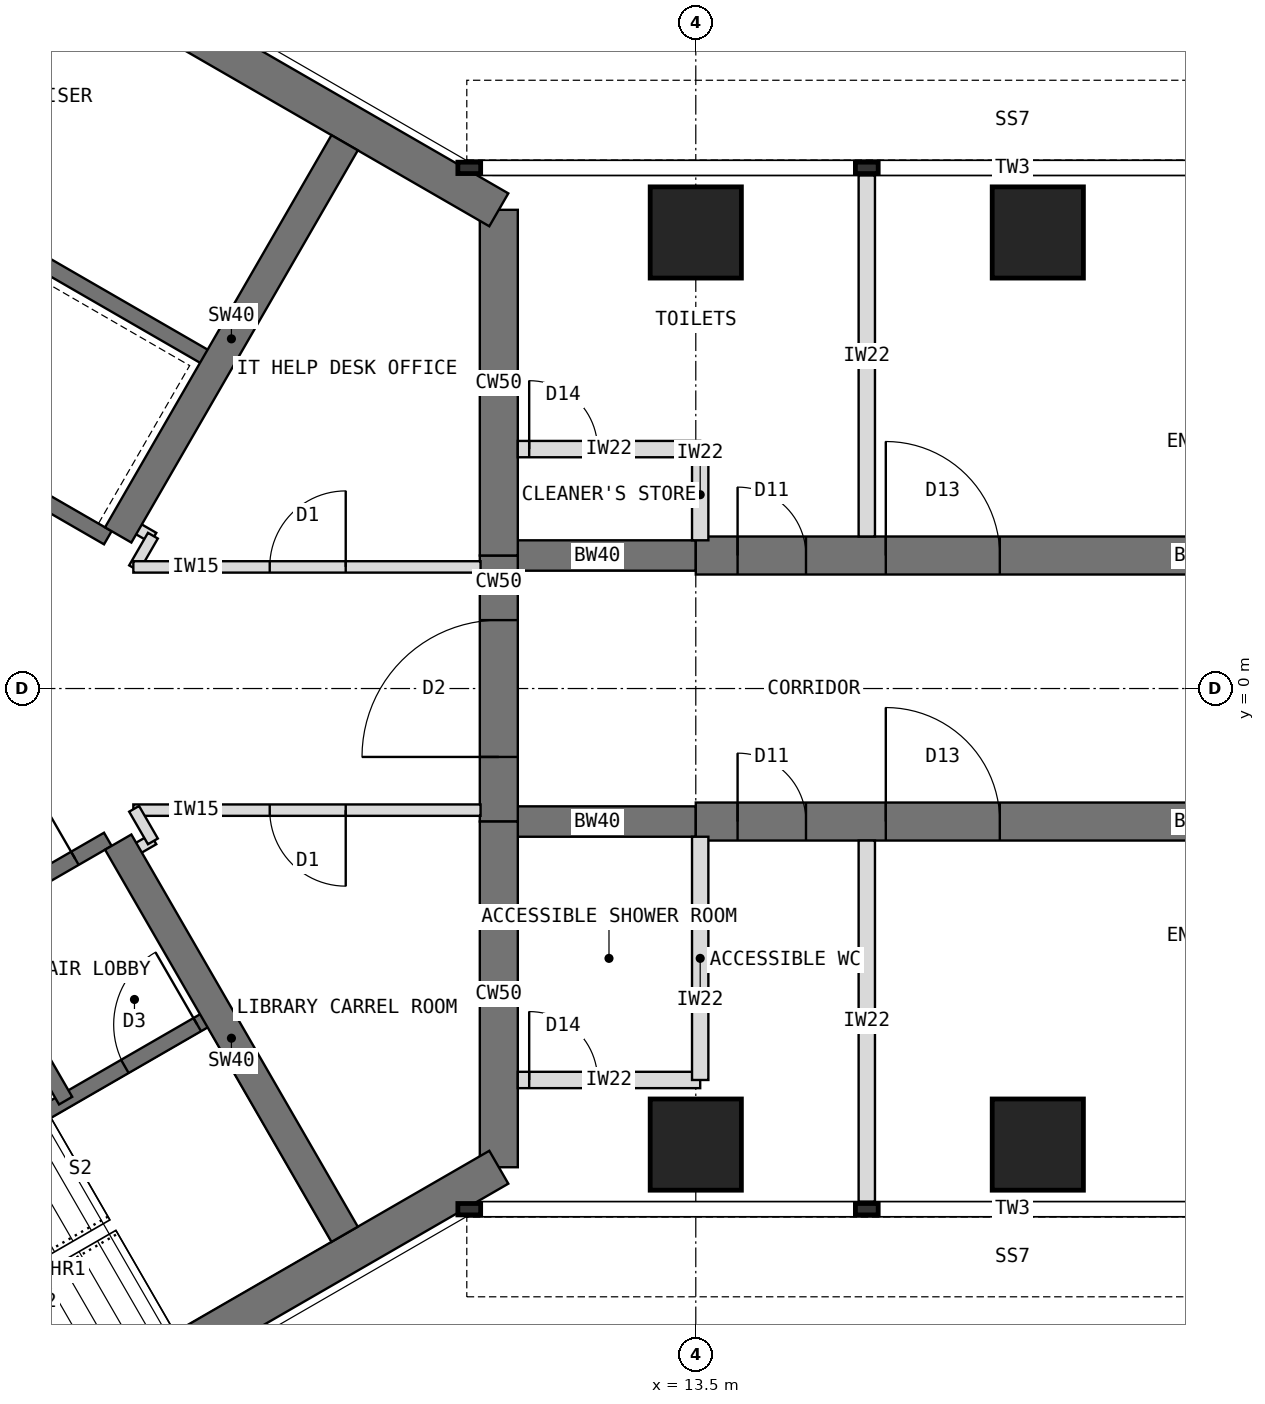
"""IFC4 building model, lengths in metres.
Left out: names, types, materials, properties, quantities, classifications, styles, units other than length and angle.
Written with IfcOpenShell. Run it as: python <this file> out.ifc"""

import sys

from ifc_helpers import new_model, si_unit, direction, frame, frame_2d, origin, origin_2d, place, context, subcontext, project, spatial, rectangle, extrude, element, fill, save


model = new_model("IFC4")
c1 = context("Model", 3, precision=1e-05, world=origin(), true_north=direction((0.0, 1.0)))
c2 = subcontext(c1, "Body", "Model", "MODEL_VIEW")
j1 = project(units=[si_unit("LENGTHUNIT", "METRE"), si_unit("PLANEANGLEUNIT", "RADIAN")], contexts=[c1])
p1 = place(None, origin())
s1 = spatial("IfcSite", under=j1, at=p1, CompositionType="ELEMENT")
p2 = place(p1, origin())
s2 = spatial("IfcBuilding", under=s1, at=p2, CompositionType="ELEMENT")
p3 = place(p2, frame((0.0, 0.0, 174.5)))
s3 = spatial("IfcBuildingStorey", under=s2, at=p3, CompositionType="ELEMENT", Elevation=174.5)
p4 = place(p3, frame((10.908, -6.298, 0.0), z_axis=(0.0, 0.0, 1.0), x_axis=(0.0, 1.0, 0.0)))
e1 = element("IfcWall", 1, at=p4, inside=s3, PredefinedType="SHEAR", context=c2, shape_type="SweptSolid", body=[
    extrude(rectangle(XDim=4.548, YDim=0.5, at=frame_2d((2.274, 0.0))), origin(), (0.0, 0.0, 1.0), 4.0),
])
p5 = place(p3, frame((10.908, -1.75, 0.0), z_axis=(0.0, 0.0, 1.0), x_axis=(0.0, 1.0, 0.0)))
e2 = element("IfcWall", 2, at=p5, inside=s3, PredefinedType="SHEAR", context=c2, shape_type="SweptSolid", body=[
    extrude(rectangle(XDim=3.5, YDim=0.5, at=frame_2d((1.75, 0.0))), origin(), (0.0, 0.0, 1.0), 4.0),
])
p6 = place(p5, frame((0.85, 0.0, 0.0)))
e3 = element("IfcOpeningElement", 3, at=p6, cuts=e2, PredefinedType="OPENING", context=c2, shape_type="SweptSolid", body=[
    extrude(rectangle(XDim=1.8, YDim=2.1, at=frame_2d((0.9, 1.05))), frame((0.0, 0.26, 0.0), z_axis=(0.0, -1.0, 0.0), x_axis=(1.0, 0.0, 0.0)), (0.0, 0.0, 1.0), 0.52),
])
p7 = place(p3, frame((10.908, 1.75, 0.0), z_axis=(0.0, 0.0, 1.0), x_axis=(0.0, 1.0, 0.0)))
e4 = element("IfcWall", 4, at=p7, inside=s3, PredefinedType="SHEAR", context=c2, shape_type="SweptSolid", body=[
    extrude(rectangle(XDim=4.548, YDim=0.5, at=frame_2d((2.274, 0.0))), origin(), (0.0, 0.0, 1.0), 4.0),
])
for number, where, z_axis, x_axis in (
    (5, (10.908, 6.298, 0.0), (0.0, 0.0, 1.0), (-0.866, 0.5, 0.0)),
    (6, (0.0, -12.596, 0.0), (0.0, 0.0, 1.0), (0.866, 0.5, 0.0)),
):
    element("IfcWall", number, at=place(p3, frame(where, z_axis=z_axis, x_axis=x_axis)), inside=s3, PredefinedType="SHEAR", context=c2, shape_type="SweptSolid", body=[
        extrude(rectangle(XDim=12.596, YDim=0.5, at=frame_2d((6.298, 0.0))), origin(), (0.0, 0.0, 1.0), 4.0),
    ])
p8 = place(p3, frame((10.908, 1.75, 0.0), z_axis=(0.0, 0.0, 1.0), x_axis=(1.0, 0.0, 0.0)))
e7 = element("IfcWall", 7, at=p8, inside=s3, PredefinedType="SHEAR", context=c2, shape_type="SweptSolid", body=[
    extrude(rectangle(XDim=2.592, YDim=0.4, at=frame_2d((1.296, 0.0))), origin(), (0.0, 0.0, 1.0), 4.0),
])
p9 = place(p3, frame((13.5, 1.75, 0.0), z_axis=(0.0, 0.0, 1.0), x_axis=(1.0, 0.0, 0.0)))
e8 = element("IfcWall", 8, at=p9, inside=s3, PredefinedType="SHEAR", context=c2, shape_type="SweptSolid", body=[
    extrude(rectangle(XDim=13.2, YDim=0.5, at=frame_2d((6.6, 0.0))), origin(), (0.0, 0.0, 1.0), 4.0),
])
p10 = place(p9, frame((0.55, 0.0, 0.0)))
e9 = element("IfcOpeningElement", 9, at=p10, cuts=e8, PredefinedType="OPENING", context=c2, shape_type="SweptSolid", body=[
    extrude(rectangle(XDim=0.9, YDim=2.1, at=frame_2d((0.45, 1.05))), frame((0.0, 0.26, 0.0), z_axis=(0.0, -1.0, 0.0), x_axis=(1.0, 0.0, 0.0)), (0.0, 0.0, 1.0), 0.52),
])
p11 = place(p9, frame((2.5, 0.0, 0.0)))
e10 = element("IfcOpeningElement", 10, at=p11, cuts=e8, PredefinedType="OPENING", context=c2, shape_type="SweptSolid", body=[
    extrude(rectangle(XDim=1.5, YDim=2.1, at=frame_2d((0.75, 1.05))), frame((0.0, 0.26, 0.0), z_axis=(0.0, -1.0, 0.0), x_axis=(1.0, 0.0, 0.0)), (0.0, 0.0, 1.0), 0.52),
])
p12 = place(p3, frame((10.908, -1.75, 0.0), z_axis=(0.0, 0.0, 1.0), x_axis=(1.0, 0.0, 0.0)))
e11 = element("IfcWall", 11, at=p12, inside=s3, PredefinedType="SHEAR", context=c2, shape_type="SweptSolid", body=[
    extrude(rectangle(XDim=2.592, YDim=0.4, at=frame_2d((1.296, 0.0))), origin(), (0.0, 0.0, 1.0), 4.0),
])
p13 = place(p3, frame((13.5, -1.75, 0.0), z_axis=(0.0, 0.0, 1.0), x_axis=(1.0, 0.0, 0.0)))
e12 = element("IfcWall", 12, at=p13, inside=s3, PredefinedType="SHEAR", context=c2, shape_type="SweptSolid", body=[
    extrude(rectangle(XDim=13.2, YDim=0.5, at=frame_2d((6.6, 0.0))), origin(), (0.0, 0.0, 1.0), 4.0),
])
p14 = place(p13, frame((0.55, 0.0, 0.0)))
e13 = element("IfcOpeningElement", 13, at=p14, cuts=e12, PredefinedType="OPENING", context=c2, shape_type="SweptSolid", body=[
    extrude(rectangle(XDim=0.9, YDim=2.1, at=frame_2d((0.45, 1.05))), frame((0.0, 0.26, 0.0), z_axis=(0.0, -1.0, 0.0), x_axis=(1.0, 0.0, 0.0)), (0.0, 0.0, 1.0), 0.52),
])
p15 = place(p13, frame((2.5, 0.0, 0.0)))
e14 = element("IfcOpeningElement", 14, at=p15, cuts=e12, PredefinedType="OPENING", context=c2, shape_type="SweptSolid", body=[
    extrude(rectangle(XDim=1.5, YDim=2.1, at=frame_2d((0.75, 1.05))), frame((0.0, 0.26, 0.0), z_axis=(0.0, -1.0, 0.0), x_axis=(1.0, 0.0, 0.0)), (0.0, 0.0, 1.0), 0.52),
])
for number, where, z_axis, x_axis in (
    (15, (13.5, 6.0, 0.0), (0.0, 0.0, 1.0), (1.0, 0.0, 0.0)),
    (16, (13.5, -6.0, 0.0), (0.0, 0.0, 1.0), (1.0, 0.0, 0.0)),
    (17, (18.0, 6.0, 0.0), (0.0, 0.0, 1.0), (1.0, 0.0, 0.0)),
    (18, (18.0, -6.0, 0.0), (0.0, 0.0, 1.0), (1.0, 0.0, 0.0)),
):
    element("IfcColumn", number, at=place(p3, frame(where, z_axis=z_axis, x_axis=x_axis)), inside=s3, PredefinedType="COLUMN", context=c2, shape_type="SweptSolid", body=[
        extrude(rectangle(XDim=1.2, YDim=1.2, at=origin_2d()), origin(), (0.0, 0.0, 1.0), 4.0),
    ])
p16 = place(p3, frame((5.764, 1.984, 0.0), z_axis=(0.0, 0.0, 1.0), x_axis=(-0.866026010844, 0.49999894854, 0.0)))
e19 = element("IfcWall", 19, at=p16, inside=s3, PredefinedType="SHEAR", context=c2, shape_type="SweptSolid", body=[
    extrude(rectangle(XDim=8.0, YDim=0.2, at=frame_2d((4.0, 0.0))), origin(), (0.0, 0.0, 1.0), 4.0),
])
p17 = place(p16, frame((6.3, 0.0, 0.0)))
e20 = element("IfcOpeningElement", 20, at=p17, cuts=e19, PredefinedType="OPENING", context=c2, shape_type="SweptSolid", body=[
    extrude(rectangle(XDim=1.2, YDim=2.1, at=frame_2d((0.6, 1.05))), frame((0.0, 0.11, 0.0), z_axis=(0.0, -1.0, 0.0), x_axis=(1.0, 0.0, 0.0)), (0.0, 0.0, 1.0), 0.22),
])
p18 = place(p3, frame((7.114, 4.322, 0.0), z_axis=(0.0, 0.0, 1.0), x_axis=(-0.866026010844, 0.49999894854, 0.0)))
e21 = element("IfcWall", 21, at=p18, inside=s3, PredefinedType="SHEAR", context=c2, shape_type="SweptSolid", body=[
    extrude(rectangle(XDim=8.0, YDim=0.2, at=frame_2d((4.0, 0.0))), origin(), (0.0, 0.0, 1.0), 4.0),
])
p19 = place(p18, frame((6.8, 0.0, 0.0)))
e22 = element("IfcOpeningElement", 22, at=p19, cuts=e21, PredefinedType="OPENING", context=c2, shape_type="SweptSolid", body=[
    extrude(rectangle(XDim=0.9, YDim=2.1, at=frame_2d((0.45, 1.05))), frame((0.0, 0.11, 0.0), z_axis=(0.0, -1.0, 0.0), x_axis=(1.0, 0.0, 0.0)), (0.0, 0.0, 1.0), 0.22),
])
p20 = place(p3, frame((5.901, 2.02, 0.0), z_axis=(0.0, 0.0, 1.0), x_axis=(0.500003832394, 0.86602319114, 0.0)))
e23 = element("IfcWall", 23, at=p20, inside=s3, PredefinedType="SHEAR", context=c2, shape_type="SweptSolid", body=[
    extrude(rectangle(XDim=5.958, YDim=0.4, at=frame_2d((2.979, 0.0))), origin(), (0.0, 0.0, 1.0), 4.0),
])
p21 = place(p3, frame((-1.164, -5.984, 0.0), z_axis=(0.0, 0.0, 1.0), x_axis=(0.866026010844, 0.49999894854, 0.0)))
e24 = element("IfcWall", 24, at=p21, inside=s3, PredefinedType="SHEAR", context=c2, shape_type="SweptSolid", body=[
    extrude(rectangle(XDim=8.0, YDim=0.2, at=frame_2d((4.0, 0.0))), origin(), (0.0, 0.0, 1.0), 4.0),
])
p22 = place(p21, frame((6.3, 0.0, 0.0)))
e25 = element("IfcOpeningElement", 25, at=p22, cuts=e24, PredefinedType="OPENING", context=c2, shape_type="SweptSolid", body=[
    extrude(rectangle(XDim=1.2, YDim=2.1, at=frame_2d((0.6, 1.05))), frame((0.0, 0.11, 0.0), z_axis=(0.0, -1.0, 0.0), x_axis=(1.0, 0.0, 0.0)), (0.0, 0.0, 1.0), 0.22),
])
p23 = place(p21, frame((0.9, 0.0, 0.0)))
e26 = element("IfcOpeningElement", 26, at=p23, cuts=e24, PredefinedType="OPENING", context=c2, shape_type="SweptSolid", body=[
    extrude(rectangle(XDim=1.1, YDim=2.2, at=frame_2d((0.55, 1.1))), frame((0.0, 0.11, 0.0), z_axis=(0.0, -1.0, 0.0), x_axis=(1.0, 0.0, 0.0)), (0.0, 0.0, 1.0), 0.22),
])
p24 = place(p21, frame((3.8, 0.0, 0.0)))
e27 = element("IfcOpeningElement", 27, at=p24, cuts=e24, PredefinedType="OPENING", context=c2, shape_type="SweptSolid", body=[
    extrude(rectangle(XDim=1.1, YDim=2.2, at=frame_2d((0.55, 1.1))), frame((0.0, 0.11, 0.0), z_axis=(0.0, -1.0, 0.0), x_axis=(1.0, 0.0, 0.0)), (0.0, 0.0, 1.0), 0.22),
])
p25 = place(p3, frame((3.909, -3.17, 0.0), z_axis=(0.0, 0.0, 1.0), x_axis=(0.49997716683, -0.86603858612, 0.0)))
e28 = element("IfcWall", 28, at=p25, inside=s3, PredefinedType="SHEAR", context=c2, shape_type="SweptSolid", body=[
    extrude(rectangle(XDim=2.6, YDim=0.2, at=frame_2d((1.3, 0.0))), origin(), (0.0, 0.0, 1.0), 4.0),
])
p26 = place(p3, frame((0.186, -8.322, 0.0), z_axis=(0.0, 0.0, 1.0), x_axis=(0.866026010844, 0.49999894854, 0.0)))
e29 = element("IfcWall", 29, at=p26, inside=s3, PredefinedType="SHEAR", context=c2, shape_type="SweptSolid", body=[
    extrude(rectangle(XDim=8.0, YDim=0.2, at=frame_2d((4.0, 0.0))), origin(), (0.0, 0.0, 1.0), 4.0),
])
p27 = place(p26, frame((6.7, 0.0, 0.0)))
e30 = element("IfcOpeningElement", 30, at=p27, cuts=e29, PredefinedType="OPENING", context=c2, shape_type="SweptSolid", body=[
    extrude(rectangle(XDim=1.1, YDim=2.1, at=frame_2d((0.55, 1.05))), frame((0.0, 0.11, 0.0), z_axis=(0.0, -1.0, 0.0), x_axis=(1.0, 0.0, 0.0)), (0.0, 0.0, 1.0), 0.22),
])
p28 = place(p3, frame((5.901, -2.02, 0.0), z_axis=(0.0, 0.0, 1.0), x_axis=(0.500003832394, -0.86602319114, 0.0)))
e31 = element("IfcWall", 31, at=p28, inside=s3, PredefinedType="SHEAR", context=c2, shape_type="SweptSolid", body=[
    extrude(rectangle(XDim=5.958, YDim=0.4, at=frame_2d((2.979, 0.0))), origin(), (0.0, 0.0, 1.0), 4.0),
])
p29 = place(p3, frame((15.75, 2.0, 0.0), z_axis=(0.0, 0.0, 1.0), x_axis=(0.0, 1.0, 0.0)))
e32 = element("IfcWall", 32, at=p29, inside=s3, PredefinedType="PARTITIONING", context=c2, shape_type="SweptSolid", body=[
    extrude(rectangle(XDim=4.75, YDim=0.215, at=frame_2d((2.375, 0.0))), origin(), (0.0, 0.0, 1.0), 3.8),
])
p30 = place(p3, frame((11.158, 3.15, 0.0), z_axis=(0.0, 0.0, 1.0), x_axis=(1.0, 0.0, 0.0)))
e33 = element("IfcWall", 33, at=p30, inside=s3, PredefinedType="PARTITIONING", context=c2, shape_type="SweptSolid", body=[
    extrude(rectangle(XDim=2.4, YDim=0.215, at=frame_2d((1.2, 0.0))), origin(), (0.0, 0.0, 1.0), 3.8),
])
p31 = place(p30, frame((0.15, 0.0, 0.0)))
e34 = element("IfcOpeningElement", 34, at=p31, cuts=e33, PredefinedType="OPENING", context=c2, shape_type="SweptSolid", body=[
    extrude(rectangle(XDim=0.9, YDim=2.1, at=frame_2d((0.45, 1.05))), frame((0.0, 0.117, 0.0), z_axis=(0.0, -1.0, 0.0), x_axis=(1.0, 0.0, 0.0)), (0.0, 0.0, 1.0), 0.235),
])
p32 = place(p3, frame((13.558, 1.95, 0.0), z_axis=(0.0, 0.0, 1.0), x_axis=(0.0, 1.0, 0.0)))
e35 = element("IfcWall", 35, at=p32, inside=s3, PredefinedType="PARTITIONING", context=c2, shape_type="SweptSolid", body=[
    extrude(rectangle(XDim=1.2, YDim=0.215, at=frame_2d((0.6, 0.0))), origin(), (0.0, 0.0, 1.0), 3.267),
])
p33 = place(p3, frame((15.75, -2.0, 0.0), z_axis=(0.0, 0.0, 1.0), x_axis=(0.0, -1.0, 0.0)))
e36 = element("IfcWall", 36, at=p33, inside=s3, PredefinedType="PARTITIONING", context=c2, shape_type="SweptSolid", body=[
    extrude(rectangle(XDim=4.75, YDim=0.215, at=frame_2d((2.375, 0.0))), origin(), (0.0, 0.0, 1.0), 3.8),
])
p34 = place(p3, frame((11.158, -5.15, 0.0), z_axis=(0.0, 0.0, 1.0), x_axis=(1.0, 0.0, 0.0)))
e37 = element("IfcWall", 37, at=p34, inside=s3, PredefinedType="PARTITIONING", context=c2, shape_type="SweptSolid", body=[
    extrude(rectangle(XDim=2.4, YDim=0.215, at=frame_2d((1.2, 0.0))), origin(), (0.0, 0.0, 1.0), 3.8),
])
p35 = place(p34, frame((0.15, 0.0, 0.0)))
e38 = element("IfcOpeningElement", 38, at=p35, cuts=e37, PredefinedType="OPENING", context=c2, shape_type="SweptSolid", body=[
    extrude(rectangle(XDim=0.9, YDim=2.1, at=frame_2d((0.45, 1.05))), frame((0.0, 0.117, 0.0), z_axis=(0.0, -1.0, 0.0), x_axis=(1.0, 0.0, 0.0)), (0.0, 0.0, 1.0), 0.235),
])
p36 = place(p3, frame((13.558, -1.95, 0.0), z_axis=(0.0, 0.0, 1.0), x_axis=(0.0, -1.0, 0.0)))
e39 = element("IfcWall", 39, at=p36, inside=s3, PredefinedType="PARTITIONING", context=c2, shape_type="SweptSolid", body=[
    extrude(rectangle(XDim=3.2, YDim=0.215, at=frame_2d((1.6, 0.0))), origin(), (0.0, 0.0, 1.0), 3.267),
])
for number, where, z_axis, x_axis in (
    (40, (6.365, -1.983, 0.0), (0.0, 0.0, 1.0), (-0.866, -0.5, 0.0)),
    (41, (5.992, 2.198, 0.0), (0.0, 0.0, 1.0), (0.866, -0.5, 0.0)),
):
    element("IfcWall", number, at=place(p3, frame(where, z_axis=z_axis, x_axis=x_axis)), inside=s3, PredefinedType="PARTITIONING", context=c2, shape_type="SweptSolid", body=[
        extrude(rectangle(XDim=0.43, YDim=0.15, at=frame_2d((0.215, 0.0))), origin(), (0.0, 0.0, 1.0), 3.8),
    ])
p37 = place(p3, frame((6.357, 2.011, 0.0), z_axis=(0.0, 0.0, 1.0), x_axis=(-0.50033519877, -0.865831790172, 0.0)))
e42 = element("IfcWall", 42, at=p37, inside=s3, PredefinedType="PARTITIONING", context=c2, shape_type="SweptSolid", body=[
    extrude(rectangle(XDim=0.494, YDim=0.15, at=frame_2d((0.247, 0.0))), origin(), (0.0, 0.0, 1.0), 3.8),
])
p38 = place(p3, frame((6.1, 1.6, 0.0), z_axis=(0.0, 0.0, 1.0), x_axis=(1.0, 0.0, 0.0)))
e43 = element("IfcWall", 43, at=p38, inside=s3, PredefinedType="PARTITIONING", context=c2, shape_type="SweptSolid", body=[
    extrude(rectangle(XDim=4.568, YDim=0.15, at=frame_2d((2.284, 0.0))), origin(), (0.0, 0.0, 1.0), 3.8),
])
p39 = place(p38, frame((1.794, 0.0, 0.0)))
e44 = element("IfcOpeningElement", 44, at=p39, cuts=e43, PredefinedType="OPENING", context=c2, shape_type="SweptSolid", body=[
    extrude(rectangle(XDim=1.0, YDim=2.1, at=frame_2d((0.5, 1.05))), frame((0.0, 0.085, 0.0), z_axis=(0.0, -1.0, 0.0), x_axis=(1.0, 0.0, 0.0)), (0.0, 0.0, 1.0), 0.17),
])
p40 = place(p3, frame((10.668, -1.6, 0.0), z_axis=(0.0, 0.0, 1.0), x_axis=(-1.0, 0.0, 0.0)))
e45 = element("IfcWall", 45, at=p40, inside=s3, PredefinedType="PARTITIONING", context=c2, shape_type="SweptSolid", body=[
    extrude(rectangle(XDim=4.568, YDim=0.15, at=frame_2d((2.284, 0.0))), origin(), (0.0, 0.0, 1.0), 3.8),
])
p41 = place(p40, frame((1.774, 0.0, 0.0)))
e46 = element("IfcOpeningElement", 46, at=p41, cuts=e45, PredefinedType="OPENING", context=c2, shape_type="SweptSolid", body=[
    extrude(rectangle(XDim=1.0, YDim=2.1, at=frame_2d((0.5, 1.05))), frame((0.0, 0.085, 0.0), z_axis=(0.0, -1.0, 0.0), x_axis=(1.0, 0.0, 0.0)), (0.0, 0.0, 1.0), 0.17),
])
p42 = place(p3, frame((6.11, -1.583, 0.0), z_axis=(0.0, 0.0, 1.0), x_axis=(0.50033519877, -0.865831790172, 0.0)))
e47 = element("IfcWall", 47, at=p42, inside=s3, PredefinedType="PARTITIONING", context=c2, shape_type="SweptSolid", body=[
    extrude(rectangle(XDim=0.494, YDim=0.15, at=frame_2d((0.247, 0.0))), origin(), (0.0, 0.0, 1.0), 3.8),
])
p43 = place(p22, origin())
e48 = element("IfcDoor", 48, at=p43, inside=s3, OperationType="SINGLE_SWING_RIGHT", PredefinedType="DOOR", context=c2, shape_type="SweptSolid", body=[
    extrude(rectangle(XDim=1.2, YDim=2.1, at=frame_2d((0.6, 1.05))), frame((0.0, 0.025, 0.0), z_axis=(0.0, -1.0, 0.0), x_axis=(1.0, 0.0, 0.0)), (0.0, 0.0, 1.0), 0.05),
])
fill(e25, e48)
p44 = place(p27, origin())
e49 = element("IfcDoor", 49, at=p44, inside=s3, OperationType="SINGLE_SWING_RIGHT", PredefinedType="DOOR", context=c2, shape_type="SweptSolid", body=[
    extrude(rectangle(XDim=1.1, YDim=2.1, at=frame_2d((0.55, 1.05))), frame((0.0, 0.025, 0.0), z_axis=(0.0, -1.0, 0.0), x_axis=(1.0, 0.0, 0.0)), (0.0, 0.0, 1.0), 0.05),
])
fill(e30, e49)
p45 = place(p6, origin())
e50 = element("IfcDoor", 50, at=p45, inside=s3, OperationType="DOUBLE_DOOR_DOUBLE_SWING", PredefinedType="DOOR", context=c2, shape_type="SweptSolid", body=[
    extrude(rectangle(XDim=1.8, YDim=2.1, at=frame_2d((0.9, 1.05))), frame((0.0, 0.025, 0.0), z_axis=(0.0, -1.0, 0.0), x_axis=(1.0, 0.0, 0.0)), (0.0, 0.0, 1.0), 0.05),
])
fill(e3, e50)
p46 = place(p31, origin())
e51 = element("IfcDoor", 51, at=p46, inside=s3, OperationType="SINGLE_SWING_LEFT", PredefinedType="DOOR", context=c2, shape_type="SweptSolid", body=[
    extrude(rectangle(XDim=0.9, YDim=2.1, at=frame_2d((0.45, 1.05))), frame((0.0, 0.025, 0.0), z_axis=(0.0, -1.0, 0.0), x_axis=(1.0, 0.0, 0.0)), (0.0, 0.0, 1.0), 0.05),
])
fill(e34, e51)
p47 = place(p35, origin())
e52 = element("IfcDoor", 52, at=p47, inside=s3, OperationType="SINGLE_SWING_LEFT", PredefinedType="DOOR", context=c2, shape_type="SweptSolid", body=[
    extrude(rectangle(XDim=0.9, YDim=2.1, at=frame_2d((0.45, 1.05))), frame((0.0, 0.025, 0.0), z_axis=(0.0, -1.0, 0.0), x_axis=(1.0, 0.0, 0.0)), (0.0, 0.0, 1.0), 0.05),
])
fill(e38, e52)
p48 = place(p41, origin())
e53 = element("IfcDoor", 53, at=p48, inside=s3, OperationType="SINGLE_SWING_LEFT", PredefinedType="DOOR", context=c2, shape_type="SweptSolid", body=[
    extrude(rectangle(XDim=1.0, YDim=2.1, at=frame_2d((0.5, 1.05))), frame((0.0, 0.025, 0.0), z_axis=(0.0, -1.0, 0.0), x_axis=(1.0, 0.0, 0.0)), (0.0, 0.0, 1.0), 0.05),
])
fill(e46, e53)
p49 = place(p39, origin())
e54 = element("IfcDoor", 54, at=p49, inside=s3, OperationType="SINGLE_SWING_RIGHT", PredefinedType="DOOR", context=c2, shape_type="SweptSolid", body=[
    extrude(rectangle(XDim=1.0, YDim=2.1, at=frame_2d((0.5, 1.05))), frame((0.0, 0.025, 0.0), z_axis=(0.0, -1.0, 0.0), x_axis=(1.0, 0.0, 0.0)), (0.0, 0.0, 1.0), 0.05),
])
fill(e44, e54)
p50 = place(p10, origin())
e55 = element("IfcDoor", 55, at=p50, inside=s3, OperationType="SINGLE_SWING_LEFT", PredefinedType="DOOR", context=c2, shape_type="SweptSolid", body=[
    extrude(rectangle(XDim=0.9, YDim=2.1, at=frame_2d((0.45, 1.05))), frame((0.0, 0.025, 0.0), z_axis=(0.0, -1.0, 0.0), x_axis=(1.0, 0.0, 0.0)), (0.0, 0.0, 1.0), 0.05),
])
fill(e9, e55)
p51 = place(p11, origin())
e56 = element("IfcDoor", 56, at=p51, inside=s3, OperationType="DOUBLE_DOOR_SINGLE_SWING", PredefinedType="DOOR", context=c2, shape_type="SweptSolid", body=[
    extrude(rectangle(XDim=1.5, YDim=2.1, at=frame_2d((0.75, 1.05))), frame((0.0, 0.025, 0.0), z_axis=(0.0, -1.0, 0.0), x_axis=(1.0, 0.0, 0.0)), (0.0, 0.0, 1.0), 0.05),
])
fill(e10, e56)
p52 = place(p14, origin())
e57 = element("IfcDoor", 57, at=p52, inside=s3, OperationType="SINGLE_SWING_LEFT", PredefinedType="DOOR", context=c2, shape_type="SweptSolid", body=[
    extrude(rectangle(XDim=0.9, YDim=2.1, at=frame_2d((0.45, 1.05))), frame((0.0, 0.025, 0.0), z_axis=(0.0, -1.0, 0.0), x_axis=(1.0, 0.0, 0.0)), (0.0, 0.0, 1.0), 0.05),
])
fill(e13, e57)
p53 = place(p15, origin())
e58 = element("IfcDoor", 58, at=p53, inside=s3, OperationType="DOUBLE_DOOR_SINGLE_SWING", PredefinedType="DOOR", context=c2, shape_type="SweptSolid", body=[
    extrude(rectangle(XDim=1.5, YDim=2.1, at=frame_2d((0.75, 1.05))), frame((0.0, 0.025, 0.0), z_axis=(0.0, -1.0, 0.0), x_axis=(1.0, 0.0, 0.0)), (0.0, 0.0, 1.0), 0.05),
])
fill(e14, e58)
save(model, sys.argv[1])
